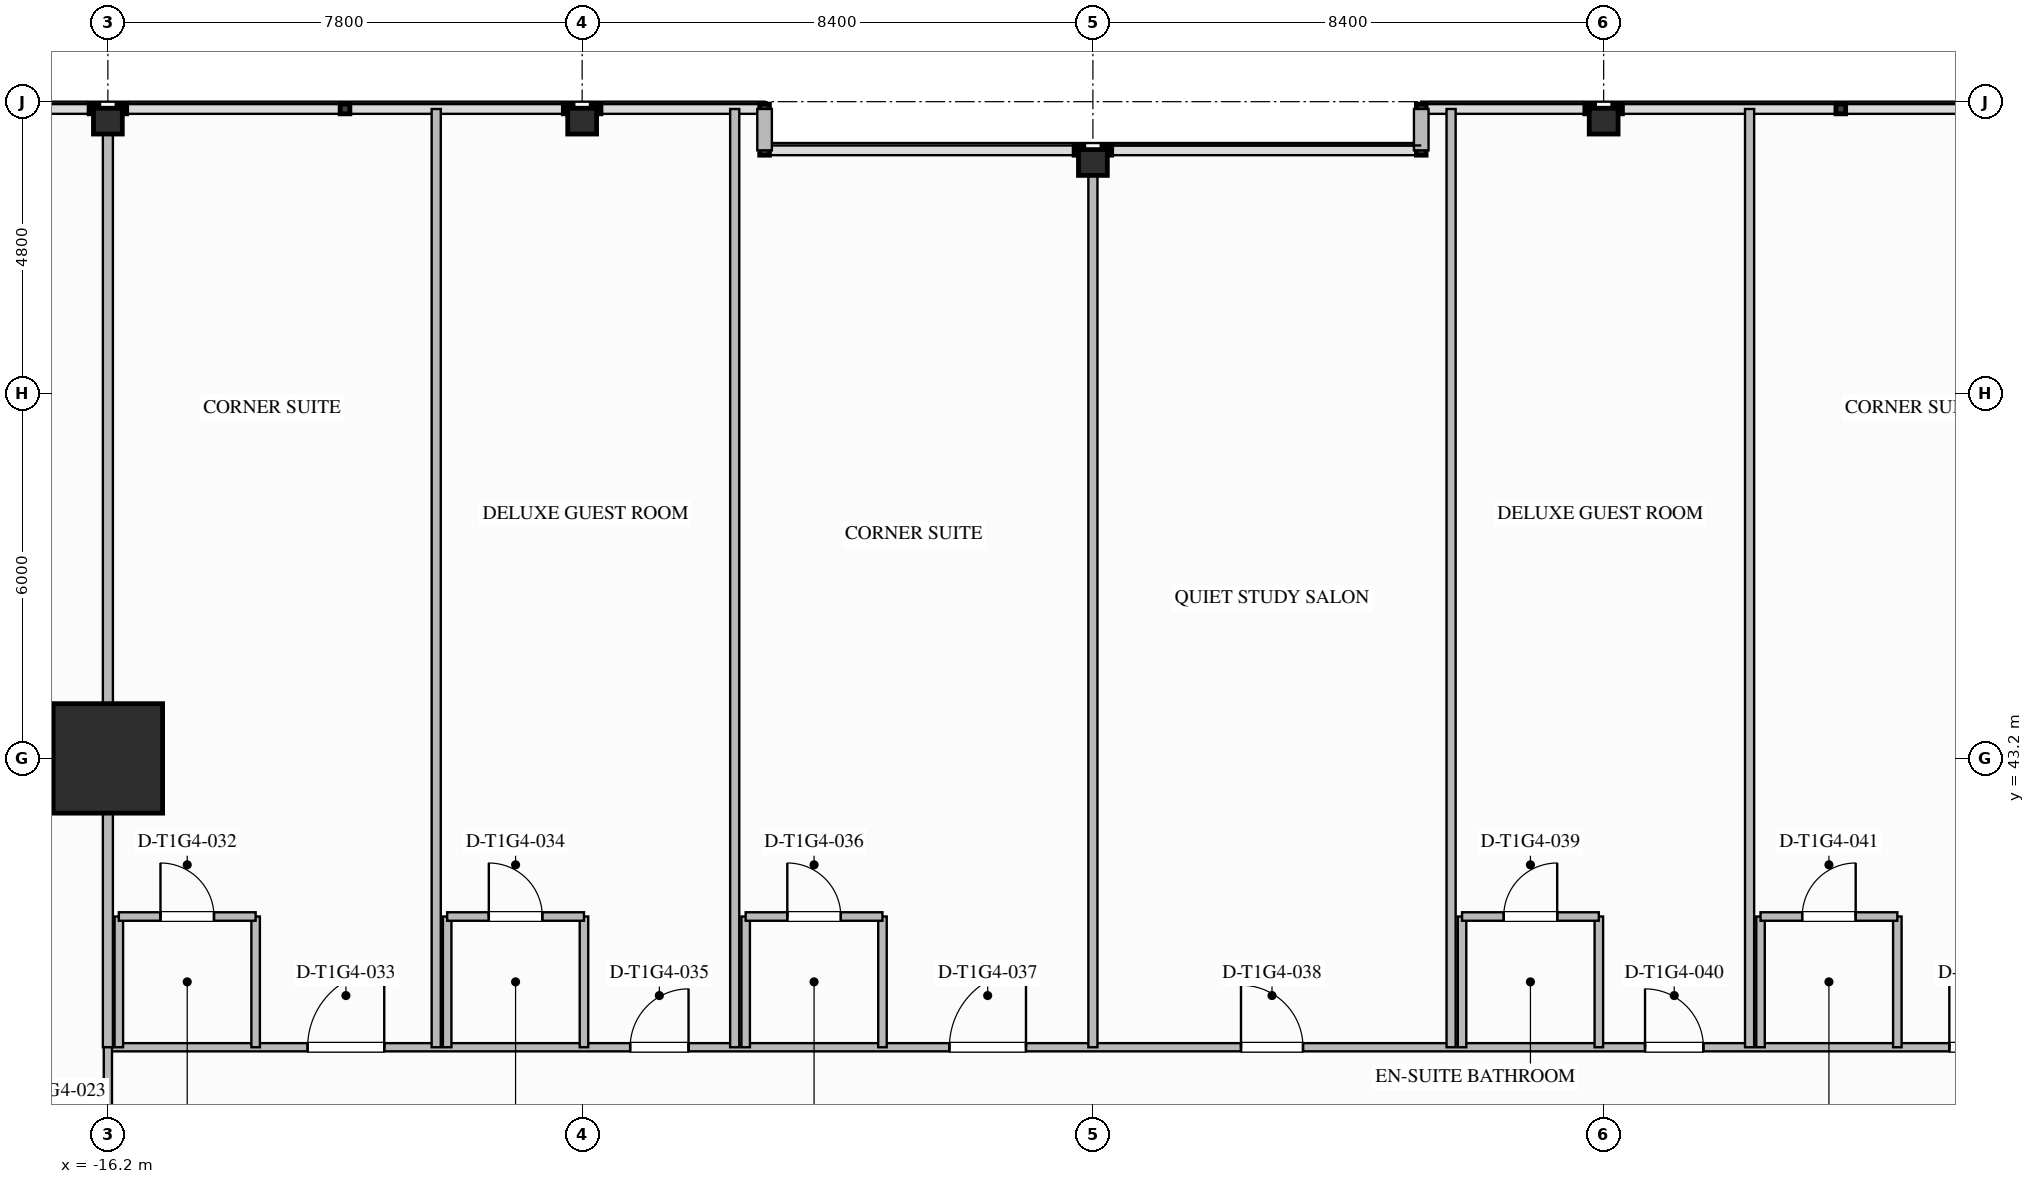
"""IFC4 building model, lengths in metres.
Left out: names, types, materials, properties, quantities, classifications, styles, units other than length and angle.
Written with IfcOpenShell. Run it as: python <this file> out.ifc"""

import sys

from ifc_helpers import new_model, si_unit, direction, frame, frame_2d, origin, origin_2d, place, context, subcontext, project, spatial, rectangle, i_section, extrude, element, fill, save


model = new_model("IFC4")
c1 = context("Model", 3, precision=1e-05, world=origin(), true_north=direction((0.0, 1.0)))
c2 = subcontext(c1, "Body", "Model", "MODEL_VIEW")
j1 = project(units=[si_unit("LENGTHUNIT", "METRE"), si_unit("PLANEANGLEUNIT", "RADIAN")], contexts=[c1])
p1 = place(None, origin())
s1 = spatial("IfcSite", under=j1, at=p1, CompositionType="ELEMENT")
p2 = place(p1, origin())
s2 = spatial("IfcBuilding", under=s1, at=p2, CompositionType="ELEMENT")
p3 = place(p2, frame((0.0, 0.0, 64.7)))
s3 = spatial("IfcBuildingStorey", under=s2, at=p3, CompositionType="ELEMENT", Elevation=64.7)
p4 = place(p3, frame((-16.2, 43.2, 0.0), z_axis=(0.0, 0.0, 1.0), x_axis=(1.0, 0.0, 0.0)))
e1 = element("IfcColumn", 1, at=p4, inside=s3, PredefinedType="COLUMN", context=c2, shape_type="SweptSolid", body=[
    extrude(rectangle(XDim=1.8, YDim=1.8, at=origin_2d()), origin(), (0.0, 0.0, 1.0), 3.5),
])
for number, where, z_axis, x_axis in (
    (2, (-16.2, 53.68, 0.0), (0.0, 0.0, 1.0), (0.0, 1.0, 0.0)),
    (3, (-8.4, 53.68, 0.0), (0.0, 0.0, 1.0), (0.0, 1.0, 0.0)),
    (4, (0.0, 53.0, 0.0), (0.0, 0.0, 1.0), (0.0, 1.0, 0.0)),
    (5, (8.4, 53.68, 0.0), (0.0, 0.0, 1.0), (0.0, 1.0, 0.0)),
):
    element("IfcColumn", number, at=place(p3, frame(where, z_axis=z_axis, x_axis=x_axis)), inside=s3, PredefinedType="COLUMN", context=c2, shape_type="SweptSolid", body=[
        extrude(i_section(OverallWidth=0.424, OverallDepth=0.474, WebThickness=0.048, FlangeThickness=0.077, FilletRadius=0.03, at=origin_2d()), origin(), (0.0, 0.0, 1.0), 3.497),
    ])
for number, where, z_axis, x_axis in (
    (6, (-5.4, 53.88, 0.0), (0.0, 0.0, 1.0), (0.0, -1.0, 0.0)),
    (7, (5.4, 53.2, 0.0), (0.0, 0.0, 1.0), (0.0, 1.0, 0.0)),
):
    element("IfcWall", number, at=place(p3, frame(where, z_axis=z_axis, x_axis=x_axis)), inside=s3, PredefinedType="STANDARD", context=c2, shape_type="SweptSolid", body=[
        extrude(rectangle(XDim=0.68, YDim=0.24, at=frame_2d((0.34, 0.0))), origin(), (0.0, 0.0, 1.0), 3.24),
    ])
p5 = place(p3, frame((-16.2, 38.45, 0.0), z_axis=(0.0, 0.0, 1.0), x_axis=(1.0, 0.0, 0.0)))
e8 = element("IfcWall", 8, at=p5, inside=s3, PredefinedType="PARTITIONING", context=c2, shape_type="SweptSolid", body=[
    extrude(rectangle(XDim=32.4, YDim=0.135, at=frame_2d((16.2, 0.0))), origin(), (0.0, 0.0, 1.0), 3.24),
])
p6 = place(p5, frame((3.285, 0.0, 0.0)))
e9 = element("IfcOpeningElement", 9, at=p6, cuts=e8, PredefinedType="OPENING", context=c2, shape_type="SweptSolid", body=[
    extrude(rectangle(XDim=1.26, YDim=2.2, at=frame_2d((0.63, 1.1))), frame((0.0, 0.077, 0.0), z_axis=(0.0, -1.0, 0.0), x_axis=(1.0, 0.0, 0.0)), (0.0, 0.0, 1.0), 0.155),
])
p7 = place(p5, frame((8.59, 0.0, 0.0)))
e10 = element("IfcOpeningElement", 10, at=p7, cuts=e8, PredefinedType="OPENING", context=c2, shape_type="SweptSolid", body=[
    extrude(rectangle(XDim=0.96, YDim=2.15, at=frame_2d((0.48, 1.075))), frame((0.0, 0.077, 0.0), z_axis=(0.0, -1.0, 0.0), x_axis=(1.0, 0.0, 0.0)), (0.0, 0.0, 1.0), 0.155),
])
p8 = place(p5, frame((13.84, 0.0, 0.0)))
e11 = element("IfcOpeningElement", 11, at=p8, cuts=e8, PredefinedType="OPENING", context=c2, shape_type="SweptSolid", body=[
    extrude(rectangle(XDim=1.26, YDim=2.2, at=frame_2d((0.63, 1.1))), frame((0.0, 0.077, 0.0), z_axis=(0.0, -1.0, 0.0), x_axis=(1.0, 0.0, 0.0)), (0.0, 0.0, 1.0), 0.155),
])
p9 = place(p5, frame((18.635, 0.0, 0.0)))
e12 = element("IfcOpeningElement", 12, at=p9, cuts=e8, PredefinedType="OPENING", context=c2, shape_type="SweptSolid", body=[
    extrude(rectangle(XDim=1.02, YDim=2.15, at=frame_2d((0.51, 1.075))), frame((0.0, 0.077, 0.0), z_axis=(0.0, -1.0, 0.0), x_axis=(1.0, 0.0, 0.0)), (0.0, 0.0, 1.0), 0.155),
])
p10 = place(p5, frame((25.281, 0.0, 0.0)))
e13 = element("IfcOpeningElement", 13, at=p10, cuts=e8, PredefinedType="OPENING", context=c2, shape_type="SweptSolid", body=[
    extrude(rectangle(XDim=0.96, YDim=2.15, at=frame_2d((0.48, 1.075))), frame((0.0, 0.077, 0.0), z_axis=(0.0, -1.0, 0.0), x_axis=(1.0, 0.0, 0.0)), (0.0, 0.0, 1.0), 0.155),
])
p11 = place(p5, frame((30.285, 0.0, 0.0)))
e14 = element("IfcOpeningElement", 14, at=p11, cuts=e8, PredefinedType="OPENING", context=c2, shape_type="SweptSolid", body=[
    extrude(rectangle(XDim=1.26, YDim=2.2, at=frame_2d((0.63, 1.1))), frame((0.0, 0.077, 0.0), z_axis=(0.0, -1.0, 0.0), x_axis=(1.0, 0.0, 0.0)), (0.0, 0.0, 1.0), 0.155),
])
p12 = place(p3, frame((-16.2, 38.45, 0.0), z_axis=(0.0, 0.0, 1.0), x_axis=(0.0, 1.0, 0.0)))
e15 = element("IfcWall", 15, at=p12, inside=s3, PredefinedType="PARTITIONING", context=c2, shape_type="SweptSolid", body=[
    extrude(rectangle(XDim=15.43, YDim=0.165, at=frame_2d((7.715, 0.0))), origin(), (0.0, 0.0, 1.0), 2.452),
])
p13 = place(p3, frame((-16.2, 35.7, 0.0), z_axis=(0.0, 0.0, 1.0), x_axis=(0.0, 1.0, 0.0)))
e16 = element("IfcWall", 16, at=p13, inside=s3, PredefinedType="PARTITIONING", context=c2, shape_type="SweptSolid", body=[
    extrude(rectangle(XDim=2.75, YDim=0.135, at=frame_2d((1.375, 0.0))), origin(), (0.0, 0.0, 1.0), 2.452),
])
p14 = place(p13, frame((0.52, 0.0, 0.0)))
e17 = element("IfcOpeningElement", 17, at=p14, cuts=e16, PredefinedType="OPENING", context=c2, shape_type="SweptSolid", body=[
    extrude(rectangle(XDim=1.02, YDim=2.15, at=frame_2d((0.51, 1.075))), frame((0.0, 0.077, 0.0), z_axis=(0.0, -1.0, 0.0), x_axis=(1.0, 0.0, 0.0)), (0.0, 0.0, 1.0), 0.155),
])
p15 = place(p3, frame((-16.02, 38.45, 0.0), z_axis=(0.0, 0.0, 1.0), x_axis=(0.0, 1.0, 0.0)))
e18 = element("IfcWall", 18, at=p15, inside=s3, PredefinedType="PLUMBINGWALL", context=c2, shape_type="SweptSolid", body=[
    extrude(rectangle(XDim=2.15, YDim=0.14, at=frame_2d((1.075, 0.0))), origin(), (0.0, 0.0, 1.0), 2.452),
])
p16 = place(p3, frame((-13.77, 38.45, 0.0), z_axis=(0.0, 0.0, 1.0), x_axis=(0.0, 1.0, 0.0)))
e19 = element("IfcWall", 19, at=p16, inside=s3, PredefinedType="PLUMBINGWALL", context=c2, shape_type="SweptSolid", body=[
    extrude(rectangle(XDim=2.15, YDim=0.14, at=frame_2d((1.075, 0.0))), origin(), (0.0, 0.0, 1.0), 3.24),
])
p17 = place(p3, frame((-16.02, 40.6, 0.0), z_axis=(0.0, 0.0, 1.0), x_axis=(1.0, 0.0, 0.0)))
e20 = element("IfcWall", 20, at=p17, inside=s3, PredefinedType="PLUMBINGWALL", context=c2, shape_type="SweptSolid", body=[
    extrude(rectangle(XDim=2.25, YDim=0.14, at=frame_2d((1.125, 0.0))), origin(), (0.0, 0.0, 1.0), 3.24),
])
p18 = place(p17, frame((0.685, 0.0, 0.0)))
e21 = element("IfcOpeningElement", 21, at=p18, cuts=e20, PredefinedType="OPENING", context=c2, shape_type="SweptSolid", body=[
    extrude(rectangle(XDim=0.88, YDim=2.1, at=frame_2d((0.44, 1.05))), frame((0.0, 0.08, 0.0), z_axis=(0.0, -1.0, 0.0), x_axis=(1.0, 0.0, 0.0)), (0.0, 0.0, 1.0), 0.16),
])
p19 = place(p3, frame((-10.8, 38.45, 0.0), z_axis=(0.0, 0.0, 1.0), x_axis=(0.0, 1.0, 0.0)))
e22 = element("IfcWall", 22, at=p19, inside=s3, PredefinedType="PARTITIONING", context=c2, shape_type="SweptSolid", body=[
    extrude(rectangle(XDim=15.43, YDim=0.15, at=frame_2d((7.715, 0.0))), origin(), (0.0, 0.0, 1.0), 3.24),
])
p20 = place(p3, frame((-10.62, 38.45, 0.0), z_axis=(0.0, 0.0, 1.0), x_axis=(0.0, 1.0, 0.0)))
e23 = element("IfcWall", 23, at=p20, inside=s3, PredefinedType="PLUMBINGWALL", context=c2, shape_type="SweptSolid", body=[
    extrude(rectangle(XDim=2.15, YDim=0.14, at=frame_2d((1.075, 0.0))), origin(), (0.0, 0.0, 1.0), 3.24),
])
p21 = place(p3, frame((-8.37, 38.45, 0.0), z_axis=(0.0, 0.0, 1.0), x_axis=(0.0, 1.0, 0.0)))
e24 = element("IfcWall", 24, at=p21, inside=s3, PredefinedType="PLUMBINGWALL", context=c2, shape_type="SweptSolid", body=[
    extrude(rectangle(XDim=2.15, YDim=0.14, at=frame_2d((1.075, 0.0))), origin(), (0.0, 0.0, 1.0), 2.617),
])
p22 = place(p3, frame((-10.62, 40.6, 0.0), z_axis=(0.0, 0.0, 1.0), x_axis=(1.0, 0.0, 0.0)))
e25 = element("IfcWall", 25, at=p22, inside=s3, PredefinedType="PLUMBINGWALL", context=c2, shape_type="SweptSolid", body=[
    extrude(rectangle(XDim=2.25, YDim=0.14, at=frame_2d((1.125, 0.0))), origin(), (0.0, 0.0, 1.0), 3.24),
])
p23 = place(p22, frame((0.685, 0.0, 0.0)))
e26 = element("IfcOpeningElement", 26, at=p23, cuts=e25, PredefinedType="OPENING", context=c2, shape_type="SweptSolid", body=[
    extrude(rectangle(XDim=0.88, YDim=2.1, at=frame_2d((0.44, 1.05))), frame((0.0, 0.08, 0.0), z_axis=(0.0, -1.0, 0.0), x_axis=(1.0, 0.0, 0.0)), (0.0, 0.0, 1.0), 0.16),
])
p24 = place(p3, frame((-5.891, 38.45, 0.0), z_axis=(0.0, 0.0, 1.0), x_axis=(0.0, 1.0, 0.0)))
e27 = element("IfcWall", 27, at=p24, inside=s3, PredefinedType="PARTITIONING", context=c2, shape_type="SweptSolid", body=[
    extrude(rectangle(XDim=15.43, YDim=0.15, at=frame_2d((7.715, 0.0))), origin(), (0.0, 0.0, 1.0), 3.24),
])
for number, where, z_axis, x_axis in (
    (28, (-5.711, 38.45, 0.0), (0.0, 0.0, 1.0), (0.0, 1.0, 0.0)),
    (29, (-3.461, 38.45, 0.0), (0.0, 0.0, 1.0), (0.0, 1.0, 0.0)),
):
    element("IfcWall", number, at=place(p3, frame(where, z_axis=z_axis, x_axis=x_axis)), inside=s3, PredefinedType="PLUMBINGWALL", context=c2, shape_type="SweptSolid", body=[
        extrude(rectangle(XDim=2.15, YDim=0.14, at=frame_2d((1.075, 0.0))), origin(), (0.0, 0.0, 1.0), 3.24),
    ])
p25 = place(p3, frame((-5.711, 40.6, 0.0), z_axis=(0.0, 0.0, 1.0), x_axis=(1.0, 0.0, 0.0)))
e30 = element("IfcWall", 30, at=p25, inside=s3, PredefinedType="PLUMBINGWALL", context=c2, shape_type="SweptSolid", body=[
    extrude(rectangle(XDim=2.25, YDim=0.14, at=frame_2d((1.125, 0.0))), origin(), (0.0, 0.0, 1.0), 3.24),
])
p26 = place(p25, frame((0.685, 0.0, 0.0)))
e31 = element("IfcOpeningElement", 31, at=p26, cuts=e30, PredefinedType="OPENING", context=c2, shape_type="SweptSolid", body=[
    extrude(rectangle(XDim=0.88, YDim=2.1, at=frame_2d((0.44, 1.05))), frame((0.0, 0.08, 0.0), z_axis=(0.0, -1.0, 0.0), x_axis=(1.0, 0.0, 0.0)), (0.0, 0.0, 1.0), 0.16),
])
p27 = place(p3, frame((0.0, 38.45, 0.0), z_axis=(0.0, 0.0, 1.0), x_axis=(0.0, 1.0, 0.0)))
e32 = element("IfcWall", 32, at=p27, inside=s3, PredefinedType="PARTITIONING", context=c2, shape_type="SweptSolid", body=[
    extrude(rectangle(XDim=14.75, YDim=0.15, at=frame_2d((7.375, 0.0))), origin(), (0.0, 0.0, 1.0), 2.452),
])
p28 = place(p3, frame((5.891, 38.45, 0.0), z_axis=(0.0, 0.0, 1.0), x_axis=(0.0, 1.0, 0.0)))
e33 = element("IfcWall", 33, at=p28, inside=s3, PredefinedType="PARTITIONING", context=c2, shape_type="SweptSolid", body=[
    extrude(rectangle(XDim=15.43, YDim=0.15, at=frame_2d((7.715, 0.0))), origin(), (0.0, 0.0, 1.0), 3.24),
])
p29 = place(p3, frame((6.071, 38.45, 0.0), z_axis=(0.0, 0.0, 1.0), x_axis=(0.0, 1.0, 0.0)))
e34 = element("IfcWall", 34, at=p29, inside=s3, PredefinedType="PLUMBINGWALL", context=c2, shape_type="SweptSolid", body=[
    extrude(rectangle(XDim=2.15, YDim=0.14, at=frame_2d((1.075, 0.0))), origin(), (0.0, 0.0, 1.0), 3.24),
])
p30 = place(p3, frame((8.321, 38.45, 0.0), z_axis=(0.0, 0.0, 1.0), x_axis=(0.0, 1.0, 0.0)))
e35 = element("IfcWall", 35, at=p30, inside=s3, PredefinedType="PLUMBINGWALL", context=c2, shape_type="SweptSolid", body=[
    extrude(rectangle(XDim=2.15, YDim=0.14, at=frame_2d((1.075, 0.0))), origin(), (0.0, 0.0, 1.0), 2.617),
])
p31 = place(p3, frame((6.071, 40.6, 0.0), z_axis=(0.0, 0.0, 1.0), x_axis=(1.0, 0.0, 0.0)))
e36 = element("IfcWall", 36, at=p31, inside=s3, PredefinedType="PLUMBINGWALL", context=c2, shape_type="SweptSolid", body=[
    extrude(rectangle(XDim=2.25, YDim=0.14, at=frame_2d((1.125, 0.0))), origin(), (0.0, 0.0, 1.0), 3.24),
])
p32 = place(p31, frame((0.685, 0.0, 0.0)))
e37 = element("IfcOpeningElement", 37, at=p32, cuts=e36, PredefinedType="OPENING", context=c2, shape_type="SweptSolid", body=[
    extrude(rectangle(XDim=0.88, YDim=2.1, at=frame_2d((0.44, 1.05))), frame((0.0, 0.08, 0.0), z_axis=(0.0, -1.0, 0.0), x_axis=(1.0, 0.0, 0.0)), (0.0, 0.0, 1.0), 0.16),
])
p33 = place(p3, frame((10.8, 38.45, 0.0), z_axis=(0.0, 0.0, 1.0), x_axis=(0.0, 1.0, 0.0)))
e38 = element("IfcWall", 38, at=p33, inside=s3, PredefinedType="PARTITIONING", context=c2, shape_type="SweptSolid", body=[
    extrude(rectangle(XDim=15.43, YDim=0.15, at=frame_2d((7.715, 0.0))), origin(), (0.0, 0.0, 1.0), 3.24),
])
for number, where, z_axis, x_axis in (
    (39, (10.98, 38.45, 0.0), (0.0, 0.0, 1.0), (0.0, 1.0, 0.0)),
    (40, (13.23, 38.45, 0.0), (0.0, 0.0, 1.0), (0.0, 1.0, 0.0)),
):
    element("IfcWall", number, at=place(p3, frame(where, z_axis=z_axis, x_axis=x_axis)), inside=s3, PredefinedType="PLUMBINGWALL", context=c2, shape_type="SweptSolid", body=[
        extrude(rectangle(XDim=2.15, YDim=0.14, at=frame_2d((1.075, 0.0))), origin(), (0.0, 0.0, 1.0), 3.24),
    ])
p34 = place(p3, frame((10.98, 40.6, 0.0), z_axis=(0.0, 0.0, 1.0), x_axis=(1.0, 0.0, 0.0)))
e41 = element("IfcWall", 41, at=p34, inside=s3, PredefinedType="PLUMBINGWALL", context=c2, shape_type="SweptSolid", body=[
    extrude(rectangle(XDim=2.25, YDim=0.14, at=frame_2d((1.125, 0.0))), origin(), (0.0, 0.0, 1.0), 3.24),
])
p35 = place(p34, frame((0.685, 0.0, 0.0)))
e42 = element("IfcOpeningElement", 42, at=p35, cuts=e41, PredefinedType="OPENING", context=c2, shape_type="SweptSolid", body=[
    extrude(rectangle(XDim=0.88, YDim=2.1, at=frame_2d((0.44, 1.05))), frame((0.0, 0.08, 0.0), z_axis=(0.0, -1.0, 0.0), x_axis=(1.0, 0.0, 0.0)), (0.0, 0.0, 1.0), 0.16),
])
p36 = place(p18, origin())
e43 = element("IfcDoor", 43, at=p36, inside=s3, OperationType="SINGLE_SWING_LEFT", PredefinedType="DOOR", context=c2, shape_type="SweptSolid", body=[
    extrude(rectangle(XDim=0.88, YDim=2.1, at=frame_2d((0.44, 1.05))), frame((0.0, 0.025, 0.0), z_axis=(0.0, -1.0, 0.0), x_axis=(1.0, 0.0, 0.0)), (0.0, 0.0, 1.0), 0.05),
])
fill(e21, e43)
p37 = place(p6, origin())
e44 = element("IfcDoor", 44, at=p37, inside=s3, OperationType="SINGLE_SWING_RIGHT", PredefinedType="DOOR", context=c2, shape_type="SweptSolid", body=[
    extrude(rectangle(XDim=1.26, YDim=2.2, at=frame_2d((0.63, 1.1))), frame((0.0, 0.025, 0.0), z_axis=(0.0, -1.0, 0.0), x_axis=(1.0, 0.0, 0.0)), (0.0, 0.0, 1.0), 0.05),
])
fill(e9, e44)
p38 = place(p23, origin())
e45 = element("IfcDoor", 45, at=p38, inside=s3, OperationType="SINGLE_SWING_LEFT", PredefinedType="DOOR", context=c2, shape_type="SweptSolid", body=[
    extrude(rectangle(XDim=0.88, YDim=2.1, at=frame_2d((0.44, 1.05))), frame((0.0, 0.025, 0.0), z_axis=(0.0, -1.0, 0.0), x_axis=(1.0, 0.0, 0.0)), (0.0, 0.0, 1.0), 0.05),
])
fill(e26, e45)
p39 = place(p7, origin())
e46 = element("IfcDoor", 46, at=p39, inside=s3, OperationType="SINGLE_SWING_RIGHT", PredefinedType="DOOR", context=c2, shape_type="SweptSolid", body=[
    extrude(rectangle(XDim=0.96, YDim=2.15, at=frame_2d((0.48, 1.075))), frame((0.0, 0.025, 0.0), z_axis=(0.0, -1.0, 0.0), x_axis=(1.0, 0.0, 0.0)), (0.0, 0.0, 1.0), 0.05),
])
fill(e10, e46)
p40 = place(p26, origin())
e47 = element("IfcDoor", 47, at=p40, inside=s3, OperationType="SINGLE_SWING_LEFT", PredefinedType="DOOR", context=c2, shape_type="SweptSolid", body=[
    extrude(rectangle(XDim=0.88, YDim=2.1, at=frame_2d((0.44, 1.05))), frame((0.0, 0.025, 0.0), z_axis=(0.0, -1.0, 0.0), x_axis=(1.0, 0.0, 0.0)), (0.0, 0.0, 1.0), 0.05),
])
fill(e31, e47)
p41 = place(p8, origin())
e48 = element("IfcDoor", 48, at=p41, inside=s3, OperationType="SINGLE_SWING_RIGHT", PredefinedType="DOOR", context=c2, shape_type="SweptSolid", body=[
    extrude(rectangle(XDim=1.26, YDim=2.2, at=frame_2d((0.63, 1.1))), frame((0.0, 0.025, 0.0), z_axis=(0.0, -1.0, 0.0), x_axis=(1.0, 0.0, 0.0)), (0.0, 0.0, 1.0), 0.05),
])
fill(e11, e48)
p42 = place(p9, origin())
e49 = element("IfcDoor", 49, at=p42, inside=s3, OperationType="SINGLE_SWING_LEFT", PredefinedType="DOOR", context=c2, shape_type="SweptSolid", body=[
    extrude(rectangle(XDim=1.02, YDim=2.15, at=frame_2d((0.51, 1.075))), frame((0.0, 0.025, 0.0), z_axis=(0.0, -1.0, 0.0), x_axis=(1.0, 0.0, 0.0)), (0.0, 0.0, 1.0), 0.05),
])
fill(e12, e49)
p43 = place(p32, origin())
e50 = element("IfcDoor", 50, at=p43, inside=s3, OperationType="SINGLE_SWING_RIGHT", PredefinedType="DOOR", context=c2, shape_type="SweptSolid", body=[
    extrude(rectangle(XDim=0.88, YDim=2.1, at=frame_2d((0.44, 1.05))), frame((0.0, 0.025, 0.0), z_axis=(0.0, -1.0, 0.0), x_axis=(1.0, 0.0, 0.0)), (0.0, 0.0, 1.0), 0.05),
])
fill(e37, e50)
p44 = place(p10, origin())
e51 = element("IfcDoor", 51, at=p44, inside=s3, OperationType="SINGLE_SWING_LEFT", PredefinedType="DOOR", context=c2, shape_type="SweptSolid", body=[
    extrude(rectangle(XDim=0.96, YDim=2.15, at=frame_2d((0.48, 1.075))), frame((0.0, 0.025, 0.0), z_axis=(0.0, -1.0, 0.0), x_axis=(1.0, 0.0, 0.0)), (0.0, 0.0, 1.0), 0.05),
])
fill(e13, e51)
p45 = place(p35, origin())
e52 = element("IfcDoor", 52, at=p45, inside=s3, OperationType="SINGLE_SWING_RIGHT", PredefinedType="DOOR", context=c2, shape_type="SweptSolid", body=[
    extrude(rectangle(XDim=0.88, YDim=2.1, at=frame_2d((0.44, 1.05))), frame((0.0, 0.025, 0.0), z_axis=(0.0, -1.0, 0.0), x_axis=(1.0, 0.0, 0.0)), (0.0, 0.0, 1.0), 0.05),
])
fill(e42, e52)
p46 = place(p11, origin())
e53 = element("IfcDoor", 53, at=p46, inside=s3, OperationType="SINGLE_SWING_LEFT", PredefinedType="DOOR", context=c2, shape_type="SweptSolid", body=[
    extrude(rectangle(XDim=1.26, YDim=2.2, at=frame_2d((0.63, 1.1))), frame((0.0, 0.025, 0.0), z_axis=(0.0, -1.0, 0.0), x_axis=(1.0, 0.0, 0.0)), (0.0, 0.0, 1.0), 0.05),
])
fill(e14, e53)
save(model, sys.argv[1])
